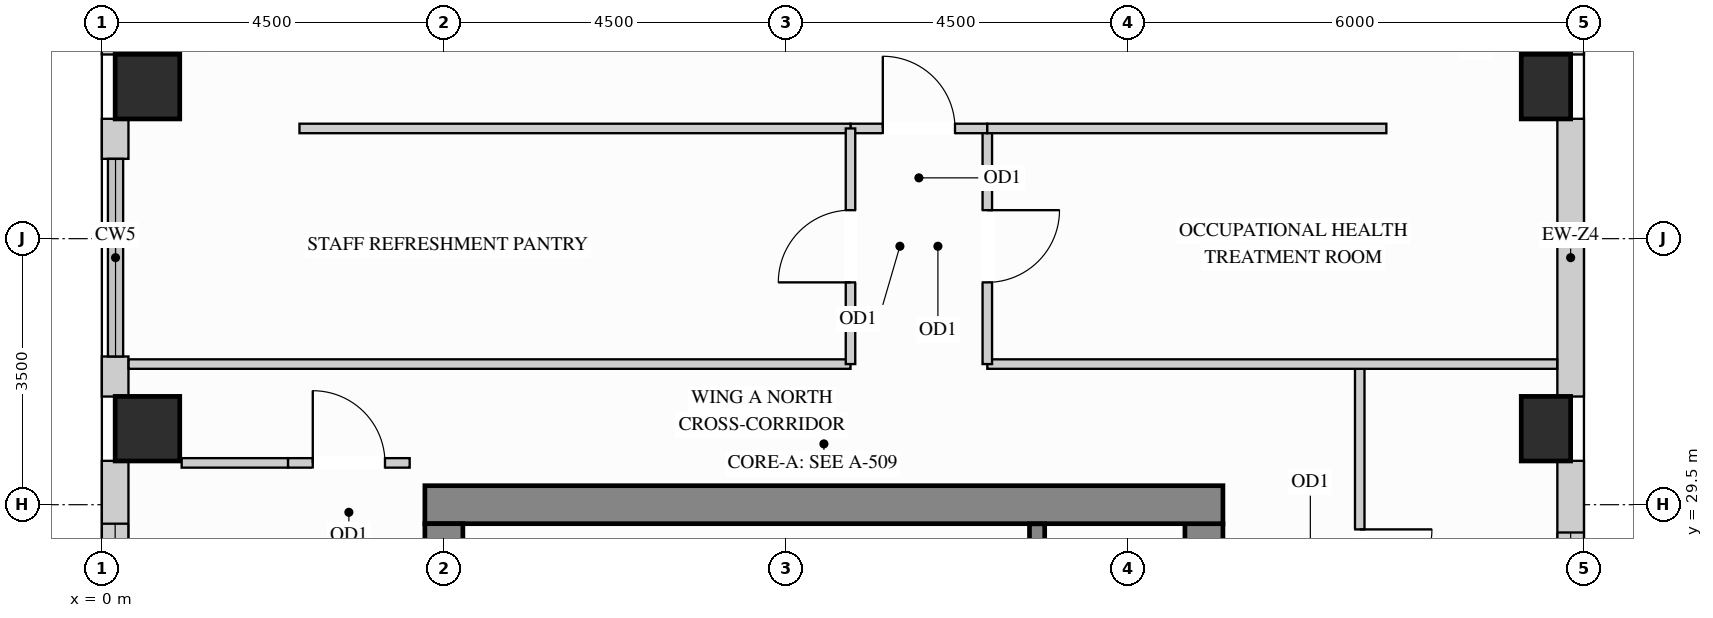
"""IFC4 building model, lengths in metres.
Left out: names, types, materials, properties, quantities, classifications, styles, units other than length and angle.
Written with IfcOpenShell. Run it as: python <this file> out.ifc"""

import sys

from ifc_helpers import new_model, si_unit, direction, frame, frame_2d, origin, origin_2d, place, context, subcontext, project, spatial, rectangle, extrude, source, transform, mapped, element, fill, save


model = new_model("IFC4")
c1 = context("Model", 3, precision=1e-05, world=origin(), true_north=direction((0.0, 1.0)))
c2 = subcontext(c1, "Body", "Model", "MODEL_VIEW")
j1 = project(units=[si_unit("LENGTHUNIT", "METRE"), si_unit("PLANEANGLEUNIT", "RADIAN")], contexts=[c1])
p1 = place(None, origin())
s1 = spatial("IfcSite", under=j1, at=p1, CompositionType="ELEMENT")
p2 = place(p1, origin())
s2 = spatial("IfcBuilding", under=s1, at=p2, CompositionType="ELEMENT")
p3 = place(p2, frame((0.0, 0.0, 248.4)))
s3 = spatial("IfcBuildingStorey", under=s2, at=p3, CompositionType="ELEMENT", Elevation=248.4)
m1 = source(origin(), c2, "Body", "SweptSolid", [
    extrude(rectangle(XDim=0.65, YDim=0.85, at=origin_2d()), origin(), (0.0, 0.0, 1.0), 3.4),
])
for number, where, z_axis, x_axis in (
    (1, (19.0, 30.5, 0.0), (0.0, 0.0, 1.0), (1.0, 0.0, 0.0)),
    (2, (19.0, 35.0, 0.0), (0.0, 0.0, 1.0), (1.0, 0.0, 0.0)),
):
    element("IfcColumn", number, at=place(p3, frame(where, z_axis=z_axis, x_axis=x_axis)), inside=s3, PredefinedType="COLUMN", context=c2, shape_type="MappedRepresentation", body=[
        mapped(m1, transform((0.0, 0.0, 0.0), x_axis=(1.0, 0.0, 0.0), y_axis=(0.0, 1.0, 0.0), z_axis=(0.0, 0.0, 1.0))),
    ])
m2 = source(origin(), c2, "Body", "SweptSolid", [
    extrude(rectangle(XDim=0.85, YDim=0.85, at=origin_2d()), origin(), (0.0, 0.0, 1.0), 3.4),
])
for number, where, z_axis, x_axis in (
    (3, (0.6, 30.5, 0.0), (0.0, 0.0, 1.0), (1.0, 0.0, 0.0)),
    (4, (0.6, 35.0, 0.0), (0.0, 0.0, 1.0), (1.0, 0.0, 0.0)),
):
    element("IfcColumn", number, at=place(p3, frame(where, z_axis=z_axis, x_axis=x_axis)), inside=s3, PredefinedType="COLUMN", context=c2, shape_type="MappedRepresentation", body=[
        mapped(m2, transform((0.0, 0.0, 0.0), x_axis=(1.0, 0.0, 0.0), y_axis=(0.0, 1.0, 0.0), z_axis=(0.0, 0.0, 1.0))),
    ])
m3 = source(origin(), c2, "Body", "SweptSolid", [
    extrude(rectangle(XDim=8.37, YDim=0.5, at=frame_2d((4.185, 0.0))), origin(), (0.0, 0.0, 1.0), 3.4),
])
p4 = place(p3, frame((14.5, 20.88, 0.0), z_axis=(0.0, 0.0, 1.0), x_axis=(0.0, 1.0, 0.0)))
e5 = element("IfcWall", 5, at=p4, inside=s3, PredefinedType="SHEAR", context=c2, shape_type="MappedRepresentation", body=[
    mapped(m3, transform((0.0, 0.0, 0.0), x_axis=(1.0, 0.0, 0.0), y_axis=(0.0, 1.0, 0.0), z_axis=(0.0, 0.0, 1.0))),
])
m4 = source(origin(), c2, "Body", "SweptSolid", [
    extrude(rectangle(XDim=10.5, YDim=0.5, at=frame_2d((5.25, 0.0))), origin(), (0.0, 0.0, 1.0), 3.4),
])
p5 = place(p3, frame((4.25, 29.5, 0.0), z_axis=(0.0, 0.0, 1.0), x_axis=(1.0, 0.0, 0.0)))
e6 = element("IfcWall", 6, at=p5, inside=s3, PredefinedType="SHEAR", context=c2, shape_type="MappedRepresentation", body=[
    mapped(m4, transform((0.0, 0.0, 0.0), x_axis=(1.0, 0.0, 0.0), y_axis=(0.0, 1.0, 0.0), z_axis=(0.0, 0.0, 1.0))),
])
m5 = source(origin(), c2, "Body", "SweptSolid", [
    extrude(rectangle(XDim=20.5, YDim=0.5, at=frame_2d((10.25, 0.0))), origin(), (0.0, 0.0, 1.0), 3.4),
])
p6 = place(p3, frame((4.5, 8.75, 0.0), z_axis=(0.0, 0.0, 1.0), x_axis=(0.0, 1.0, 0.0)))
e7 = element("IfcWall", 7, at=p6, inside=s3, PredefinedType="SHEAR", context=c2, shape_type="MappedRepresentation", body=[
    mapped(m5, transform((0.0, 0.0, 0.0), x_axis=(1.0, 0.0, 0.0), y_axis=(0.0, 1.0, 0.0), z_axis=(0.0, 0.0, 1.0))),
])
p7 = place(p3, frame((19.325, 27.223, 0.0), z_axis=(0.0, 0.0, 1.0), x_axis=(0.0, 1.0, 0.0)))
e8 = element("IfcWall", 8, at=p7, inside=s3, PredefinedType="SOLIDWALL", context=c2, shape_type="SweptSolid", body=[
    extrude(rectangle(XDim=2.854, YDim=0.35, at=frame_2d((1.427, 0.0))), origin(), (0.0, 0.0, 1.0), 2.619),
])
p8 = place(p7, frame((0.411, 0.0, 0.78)))
e9 = element("IfcOpeningElement", 9, at=p8, cuts=e8, PredefinedType="OPENING", context=c2, shape_type="SweptSolid", body=[
    extrude(rectangle(XDim=1.5, YDim=1.659, at=frame_2d((0.75, 0.83))), frame((0.0, 0.185, 0.0), z_axis=(0.0, -1.0, 0.0), x_axis=(1.0, 0.0, 0.0)), (0.0, 0.0, 1.0), 0.37),
])
m6 = source(origin(), c2, "Body", "SweptSolid", [
    extrude(rectangle(XDim=3.654, YDim=0.35, at=frame_2d((1.827, 0.0))), origin(), (0.0, 0.0, 1.0), 2.619),
])
p9 = place(p3, frame((19.325, 30.923, 0.0), z_axis=(0.0, 0.0, 1.0), x_axis=(0.0, 1.0, 0.0)))
e10 = element("IfcWall", 10, at=p9, inside=s3, PredefinedType="SOLIDWALL", context=c2, shape_type="MappedRepresentation", body=[
    mapped(m6, transform((0.0, 0.0, 0.0), x_axis=(1.0, 0.0, 0.0), y_axis=(0.0, 1.0, 0.0), z_axis=(0.0, 0.0, 1.0))),
])
m7 = source(origin(), c2, "Body", "SweptSolid", [
    extrude(rectangle(XDim=0.229, YDim=0.35, at=frame_2d((0.115, 0.0))), origin(), (0.0, 0.0, 1.0), 3.385),
])
for number, where, z_axis, x_axis in (
    (11, (19.325, 35.423, 0.0), (0.0, 0.0, 1.0), (0.0, 1.0, 0.0)),
    (12, (0.175, 35.652, 0.0), (0.0, 0.0, 1.0), (0.0, -1.0, 0.0)),
):
    element("IfcWall", number, at=place(p3, frame(where, z_axis=z_axis, x_axis=x_axis)), inside=s3, PredefinedType="SOLIDWALL", context=c2, shape_type="MappedRepresentation", body=[
        mapped(m7, transform((0.0, 0.0, 0.0), x_axis=(1.0, 0.0, 0.0), y_axis=(0.0, 1.0, 0.0), z_axis=(0.0, 0.0, 1.0))),
    ])
m8 = source(origin(), c2, "Body", "SweptSolid", [
    extrude(rectangle(XDim=0.527, YDim=0.35, at=frame_2d((0.263, 0.0))), origin(), (0.0, 0.0, 1.0), 3.385),
])
for number, where, z_axis, x_axis in (
    (13, (0.175, 34.577, 0.0), (0.0, 0.0, 1.0), (0.0, -1.0, 0.0)),
    (14, (0.175, 31.45, 0.0), (0.0, 0.0, 1.0), (0.0, -1.0, 0.0)),
):
    element("IfcWall", number, at=place(p3, frame(where, z_axis=z_axis, x_axis=x_axis)), inside=s3, PredefinedType="SOLIDWALL", context=c2, shape_type="MappedRepresentation", body=[
        mapped(m8, transform((0.0, 0.0, 0.0), x_axis=(1.0, 0.0, 0.0), y_axis=(0.0, 1.0, 0.0), z_axis=(0.0, 0.0, 1.0))),
    ])
p10 = place(p3, frame((0.175, 30.077, 0.0), z_axis=(0.0, 0.0, 1.0), x_axis=(0.0, -1.0, 0.0)))
e15 = element("IfcWall", 15, at=p10, inside=s3, PredefinedType="SOLIDWALL", context=c2, shape_type="SweptSolid", body=[
    extrude(rectangle(XDim=2.854, YDim=0.35, at=frame_2d((1.427, 0.0))), origin(), (0.0, 0.0, 1.0), 3.385),
])
p11 = place(p10, frame((0.827, 0.0, 0.78)))
e16 = element("IfcOpeningElement", 16, at=p11, cuts=e15, PredefinedType="OPENING", context=c2, shape_type="SweptSolid", body=[
    extrude(rectangle(XDim=1.2, YDim=2.25, at=frame_2d((0.6, 1.125))), frame((0.0, 0.185, 0.0), z_axis=(0.0, -1.0, 0.0), x_axis=(1.0, 0.0, 0.0)), (0.0, 0.0, 1.0), 0.37),
])
p12 = place(p3, frame((16.55, 26.05, 0.0), z_axis=(0.0, 0.0, 1.0), x_axis=(0.0, 1.0, 0.0)))
e17 = element("IfcWall", 17, at=p12, inside=s3, PredefinedType="PARTITIONING", context=c2, shape_type="SweptSolid", body=[
    extrude(rectangle(XDim=5.3, YDim=0.125, at=frame_2d((2.65, 0.0))), origin(), (0.0, 0.0, 1.0), 3.385),
])
p13 = place(p12, frame((2.175, 0.0, 0.0)))
e18 = element("IfcOpeningElement", 18, at=p13, cuts=e17, PredefinedType="OPENING", context=c2, shape_type="SweptSolid", body=[
    extrude(rectangle(XDim=0.95, YDim=2.15, at=frame_2d((0.475, 1.075))), frame((0.0, 0.073, 0.0), z_axis=(0.0, -1.0, 0.0), x_axis=(1.0, 0.0, 0.0)), (0.0, 0.0, 1.0), 0.145),
])
m9 = source(origin(), c2, "Body", "SweptSolid", [
    extrude(rectangle(XDim=7.498, YDim=0.125, at=frame_2d((3.749, 0.0))), origin(), (0.0, 0.0, 1.0), 3.385),
])
p14 = place(p3, frame((11.65, 31.35, 0.0), z_axis=(0.0, 0.0, 1.0), x_axis=(1.0, 0.0, 0.0)))
e19 = element("IfcWall", 19, at=p14, inside=s3, PredefinedType="PARTITIONING", context=c2, shape_type="MappedRepresentation", body=[
    mapped(m9, transform((0.0, 0.0, 0.0), x_axis=(1.0, 0.0, 0.0), y_axis=(0.0, 1.0, 0.0), z_axis=(0.0, 0.0, 1.0))),
])
m10 = source(origin(), c2, "Body", "SweptSolid", [
    extrude(rectangle(XDim=9.498, YDim=0.125, at=frame_2d((4.749, 0.0))), origin(), (0.0, 0.0, 1.0), 3.385),
])
p15 = place(p3, frame((0.352, 31.35, 0.0), z_axis=(0.0, 0.0, 1.0), x_axis=(1.0, 0.0, 0.0)))
e20 = element("IfcWall", 20, at=p15, inside=s3, PredefinedType="PARTITIONING", context=c2, shape_type="MappedRepresentation", body=[
    mapped(m10, transform((0.0, 0.0, 0.0), x_axis=(1.0, 0.0, 0.0), y_axis=(0.0, 1.0, 0.0), z_axis=(0.0, 0.0, 1.0))),
])
m11 = source(origin(), c2, "Body", "SweptSolid", [
    extrude(rectangle(XDim=1.4, YDim=0.125, at=frame_2d((0.7, 0.0))), origin(), (0.0, 0.0, 1.0), 3.385),
])
p16 = place(p3, frame((1.05, 30.05, 0.0), z_axis=(0.0, 0.0, 1.0), x_axis=(1.0, 0.0, 0.0)))
e21 = element("IfcWall", 21, at=p16, inside=s3, PredefinedType="PARTITIONING", context=c2, shape_type="MappedRepresentation", body=[
    mapped(m11, transform((0.0, 0.0, 0.0), x_axis=(1.0, 0.0, 0.0), y_axis=(0.0, 1.0, 0.0), z_axis=(0.0, 0.0, 1.0))),
])
p17 = place(p3, frame((2.45, 30.05, 0.0), z_axis=(0.0, 0.0, 1.0), x_axis=(1.0, 0.0, 0.0)))
e22 = element("IfcWall", 22, at=p17, inside=s3, PredefinedType="PARTITIONING", context=c2, shape_type="SweptSolid", body=[
    extrude(rectangle(XDim=1.6, YDim=0.125, at=frame_2d((0.8, 0.0))), origin(), (0.0, 0.0, 1.0), 3.385),
])
p18 = place(p17, frame((0.325, 0.0, 0.0)))
e23 = element("IfcOpeningElement", 23, at=p18, cuts=e22, PredefinedType="OPENING", context=c2, shape_type="SweptSolid", body=[
    extrude(rectangle(XDim=0.95, YDim=2.15, at=frame_2d((0.475, 1.075))), frame((0.0, 0.073, 0.0), z_axis=(0.0, -1.0, 0.0), x_axis=(1.0, 0.0, 0.0)), (0.0, 0.0, 1.0), 0.145),
])
p19 = place(p3, frame((11.65, 31.35, 0.0), z_axis=(0.0, 0.0, 1.0), x_axis=(0.0, 1.0, 0.0)))
e24 = element("IfcWall", 24, at=p19, inside=s3, PredefinedType="PARTITIONING", context=c2, shape_type="SweptSolid", body=[
    extrude(rectangle(XDim=3.1, YDim=0.125, at=frame_2d((1.55, 0.0))), origin(), (0.0, 0.0, 1.0), 3.385),
])
p20 = place(p19, frame((1.075, 0.0, 0.0)))
e25 = element("IfcOpeningElement", 25, at=p20, cuts=e24, PredefinedType="OPENING", context=c2, shape_type="SweptSolid", body=[
    extrude(rectangle(XDim=0.95, YDim=2.15, at=frame_2d((0.475, 1.075))), frame((0.0, 0.073, 0.0), z_axis=(0.0, -1.0, 0.0), x_axis=(1.0, 0.0, 0.0)), (0.0, 0.0, 1.0), 0.145),
])
p21 = place(p3, frame((9.85, 34.45, 0.0), z_axis=(0.0, 0.0, 1.0), x_axis=(1.0, 0.0, 0.0)))
e26 = element("IfcWall", 26, at=p21, inside=s3, PredefinedType="PARTITIONING", context=c2, shape_type="SweptSolid", body=[
    extrude(rectangle(XDim=1.8, YDim=0.125, at=frame_2d((0.9, 0.0))), origin(), (0.0, 0.0, 1.0), 3.385),
])
p22 = place(p21, frame((0.425, 0.0, 0.0)))
e27 = element("IfcOpeningElement", 27, at=p22, cuts=e26, PredefinedType="OPENING", context=c2, shape_type="SweptSolid", body=[
    extrude(rectangle(XDim=0.95, YDim=2.15, at=frame_2d((0.475, 1.075))), frame((0.0, 0.073, 0.0), z_axis=(0.0, -1.0, 0.0), x_axis=(1.0, 0.0, 0.0)), (0.0, 0.0, 1.0), 0.145),
])
m12 = source(origin(), c2, "Body", "SweptSolid", [
    extrude(rectangle(XDim=5.25, YDim=0.125, at=frame_2d((2.625, 0.0))), origin(), (0.0, 0.0, 1.0), 3.385),
])
p23 = place(p3, frame((11.65, 34.45, 0.0), z_axis=(0.0, 0.0, 1.0), x_axis=(1.0, 0.0, 0.0)))
e28 = element("IfcWall", 28, at=p23, inside=s3, PredefinedType="PARTITIONING", context=c2, shape_type="MappedRepresentation", body=[
    mapped(m12, transform((0.0, 0.0, 0.0), x_axis=(1.0, 0.0, 0.0), y_axis=(0.0, 1.0, 0.0), z_axis=(0.0, 0.0, 1.0))),
])
m13 = source(origin(), c2, "Body", "SweptSolid", [
    extrude(rectangle(XDim=7.25, YDim=0.125, at=frame_2d((3.625, 0.0))), origin(), (0.0, 0.0, 1.0), 3.385),
])
p24 = place(p3, frame((2.6, 34.45, 0.0), z_axis=(0.0, 0.0, 1.0), x_axis=(1.0, 0.0, 0.0)))
e29 = element("IfcWall", 29, at=p24, inside=s3, PredefinedType="PARTITIONING", context=c2, shape_type="MappedRepresentation", body=[
    mapped(m13, transform((0.0, 0.0, 0.0), x_axis=(1.0, 0.0, 0.0), y_axis=(0.0, 1.0, 0.0), z_axis=(0.0, 0.0, 1.0))),
])
p25 = place(p3, frame((9.85, 31.35, 0.0), z_axis=(0.0, 0.0, 1.0), x_axis=(0.0, 1.0, 0.0)))
e30 = element("IfcWall", 30, at=p25, inside=s3, PredefinedType="PARTITIONING", context=c2, shape_type="SweptSolid", body=[
    extrude(rectangle(XDim=3.1, YDim=0.125, at=frame_2d((1.55, 0.0))), origin(), (0.0, 0.0, 1.0), 3.385),
])
p26 = place(p25, frame((1.075, 0.0, 0.0)))
e31 = element("IfcOpeningElement", 31, at=p26, cuts=e30, PredefinedType="OPENING", context=c2, shape_type="SweptSolid", body=[
    extrude(rectangle(XDim=0.95, YDim=2.15, at=frame_2d((0.475, 1.075))), frame((0.0, 0.073, 0.0), z_axis=(0.0, -1.0, 0.0), x_axis=(1.0, 0.0, 0.0)), (0.0, 0.0, 1.0), 0.145),
])
m14 = source(origin(), c2, "Body", "SweptSolid", [
    extrude(rectangle(XDim=3.803, YDim=0.2, at=frame_2d((1.901, 0.0))), origin(), (0.0, 0.0, 1.0), 3.4),
])
p27 = place(p3, frame((12.305, 25.445, 0.0), z_axis=(0.0, 0.0, 1.0), x_axis=(0.0, 1.0, 0.0)))
e32 = element("IfcWall", 32, at=p27, inside=s3, PredefinedType="SHEAR", context=c2, shape_type="MappedRepresentation", body=[
    mapped(m14, transform((0.0, 0.0, 0.0), x_axis=(1.0, 0.0, 0.0), y_axis=(0.0, 1.0, 0.0), z_axis=(0.0, 0.0, 1.0))),
])
m15 = source(origin(), c2, "Body", "SweptSolid", [
    extrude(rectangle(XDim=0.95, YDim=2.15, at=frame_2d((0.475, 1.075))), frame((0.0, 0.025, 0.0), z_axis=(0.0, -1.0, 0.0), x_axis=(1.0, 0.0, 0.0)), (0.0, 0.0, 1.0), 0.05),
])
p28 = place(p13, origin())
e33 = element("IfcDoor", 33, at=p28, inside=s3, OperationType="SINGLE_SWING_RIGHT", PredefinedType="DOOR", context=c2, shape_type="MappedRepresentation", body=[
    mapped(m15, transform((0.0, 0.0, 0.0), x_axis=(1.0, 0.0, 0.0), y_axis=(0.0, 1.0, 0.0), z_axis=(0.0, 0.0, 1.0))),
])
fill(e18, e33)
p29 = place(p20, origin())
e34 = element("IfcDoor", 34, at=p29, inside=s3, OperationType="SINGLE_SWING_RIGHT", PredefinedType="DOOR", context=c2, shape_type="MappedRepresentation", body=[
    mapped(m15, transform((0.0, 0.0, 0.0), x_axis=(1.0, 0.0, 0.0), y_axis=(0.0, 1.0, 0.0), z_axis=(0.0, 0.0, 1.0))),
])
fill(e25, e34)
p30 = place(p22, origin())
e35 = element("IfcDoor", 35, at=p30, inside=s3, OperationType="SINGLE_SWING_LEFT", PredefinedType="DOOR", context=c2, shape_type="MappedRepresentation", body=[
    mapped(m15, transform((0.0, 0.0, 0.0), x_axis=(1.0, 0.0, 0.0), y_axis=(0.0, 1.0, 0.0), z_axis=(0.0, 0.0, 1.0))),
])
fill(e27, e35)
p31 = place(p26, origin())
e36 = element("IfcDoor", 36, at=p31, inside=s3, OperationType="SINGLE_SWING_LEFT", PredefinedType="DOOR", context=c2, shape_type="MappedRepresentation", body=[
    mapped(m15, transform((0.0, 0.0, 0.0), x_axis=(1.0, 0.0, 0.0), y_axis=(0.0, 1.0, 0.0), z_axis=(0.0, 0.0, 1.0))),
])
fill(e31, e36)
p32 = place(p18, origin())
e37 = element("IfcDoor", 37, at=p32, inside=s3, OperationType="SINGLE_SWING_LEFT", PredefinedType="DOOR", context=c2, shape_type="MappedRepresentation", body=[
    mapped(m15, transform((0.0, 0.0, 0.0), x_axis=(1.0, 0.0, 0.0), y_axis=(0.0, 1.0, 0.0), z_axis=(0.0, 0.0, 1.0))),
])
fill(e23, e37)
m16 = source(origin(), c2, "Body", "SweptSolid", [
    extrude(rectangle(XDim=1.2, YDim=2.25, at=frame_2d((0.6, 1.125))), frame((0.0, 0.03, 0.0), z_axis=(0.0, -1.0, 0.0), x_axis=(1.0, 0.0, 0.0)), (0.0, 0.0, 1.0), 0.06),
])
p33 = place(p11, origin())
e38 = element("IfcWindow", 38, at=p33, inside=s3, PartitioningType="SINGLE_PANEL", PredefinedType="WINDOW", context=c2, shape_type="MappedRepresentation", body=[
    mapped(m16, transform((0.0, 0.0, 0.0), x_axis=(1.0, 0.0, 0.0), y_axis=(0.0, 1.0, 0.0), z_axis=(0.0, 0.0, 1.0))),
])
fill(e16, e38)
m17 = source(origin(), c2, "Body", "SweptSolid", [
    extrude(rectangle(XDim=1.5, YDim=1.659, at=frame_2d((0.75, 0.83))), frame((0.0, 0.03, 0.0), z_axis=(0.0, -1.0, 0.0), x_axis=(1.0, 0.0, 0.0)), (0.0, 0.0, 1.0), 0.06),
])
p34 = place(p8, origin())
e39 = element("IfcWindow", 39, at=p34, inside=s3, PartitioningType="SINGLE_PANEL", PredefinedType="WINDOW", context=c2, shape_type="MappedRepresentation", body=[
    mapped(m17, transform((0.0, 0.0, 0.0), x_axis=(1.0, 0.0, 0.0), y_axis=(0.0, 1.0, 0.0), z_axis=(0.0, 0.0, 1.0))),
])
fill(e9, e39)
save(model, sys.argv[1])
